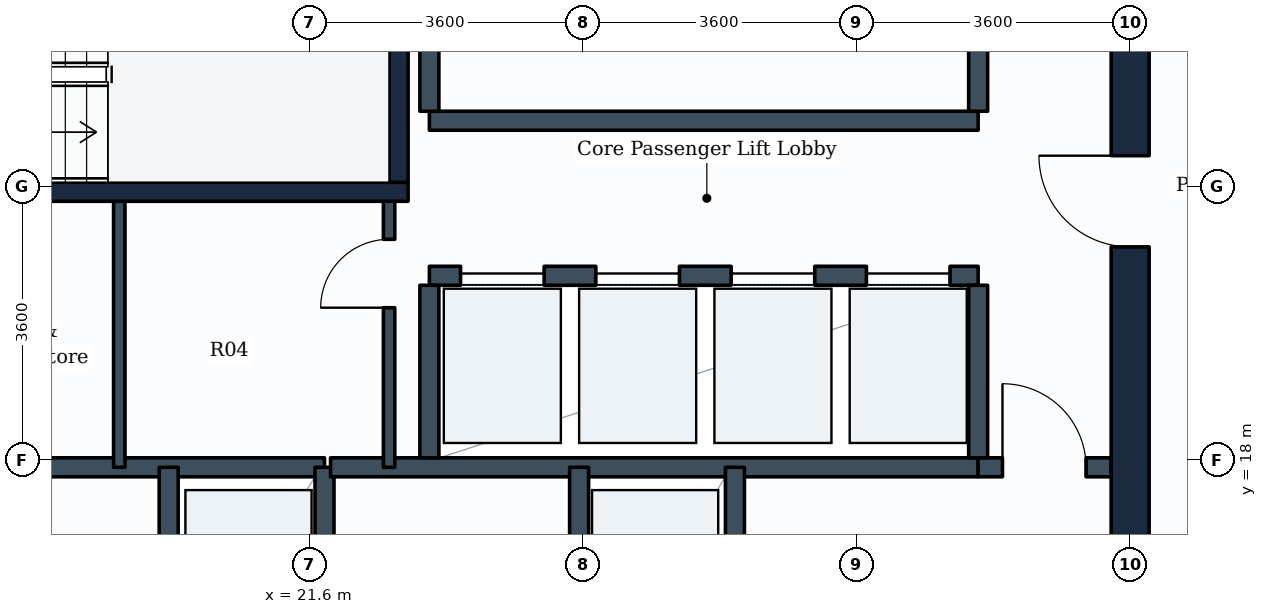
"""IFC4 building model, lengths in metres.
Left out: names, types, materials, properties, quantities, classifications, styles, units other than length and angle.
Written with IfcOpenShell. Run it as: python <this file> out.ifc"""

import sys

from ifc_helpers import new_model, si_unit, direction, frame, frame_2d, origin, place, context, subcontext, project, spatial, rectangle, extrude, element, fill, save


model = new_model("IFC4")
c1 = context("Model", 3, precision=1e-05, world=origin(), true_north=direction((0.0, 1.0)))
c2 = subcontext(c1, "Body", "Model", "MODEL_VIEW")
j1 = project(units=[si_unit("LENGTHUNIT", "METRE"), si_unit("PLANEANGLEUNIT", "RADIAN")], contexts=[c1])
p1 = place(None, origin())
s1 = spatial("IfcSite", under=j1, at=p1, CompositionType="ELEMENT")
p2 = place(p1, origin())
s2 = spatial("IfcBuilding", under=s1, at=p2, CompositionType="ELEMENT")
p3 = place(p2, frame((0.0, 0.0, 139.0)))
s3 = spatial("IfcBuildingStorey", under=s2, at=p3, CompositionType="ELEMENT", Elevation=139.0)
p4 = place(p3, frame((32.4, 10.8, 0.0), z_axis=(0.0, 0.0, 1.0), x_axis=(0.0, 1.0, 0.0)))
e1 = element("IfcWall", 1, at=p4, inside=s3, PredefinedType="SHEAR", context=c2, shape_type="SweptSolid", body=[
    extrude(rectangle(XDim=14.4, YDim=0.5, at=frame_2d((7.2, 0.0))), origin(), (0.0, 0.0, 1.0), 3.55),
])
p5 = place(p4, frame((4.35, 0.0, 0.0)))
e2 = element("IfcOpeningElement", 2, at=p5, cuts=e1, PredefinedType="OPENING", context=c2, shape_type="SweptSolid", body=[
    extrude(rectangle(XDim=1.2, YDim=2.1, at=frame_2d((0.6, 1.05))), frame((0.0, 0.26, 0.0), z_axis=(0.0, -1.0, 0.0), x_axis=(1.0, 0.0, 0.0)), (0.0, 0.0, 1.0), 0.52),
])
p6 = place(p4, frame((10.0, 0.0, 0.0)))
e3 = element("IfcOpeningElement", 3, at=p6, cuts=e1, PredefinedType="OPENING", context=c2, shape_type="SweptSolid", body=[
    extrude(rectangle(XDim=1.2, YDim=2.1, at=frame_2d((0.6, 1.05))), frame((0.0, 0.26, 0.0), z_axis=(0.0, -1.0, 0.0), x_axis=(1.0, 0.0, 0.0)), (0.0, 0.0, 1.0), 0.52),
])
p7 = place(p3, frame((14.65, 21.525, 0.0), z_axis=(0.0, 0.0, 1.0), x_axis=(1.0, 0.0, 0.0)))
e4 = element("IfcWall", 4, at=p7, inside=s3, PredefinedType="SHEAR", context=c2, shape_type="SweptSolid", body=[
    extrude(rectangle(XDim=8.25, YDim=0.25, at=frame_2d((4.125, 0.0))), origin(), (0.0, 0.0, 1.0), 3.55),
])
p8 = place(p3, frame((22.775, 21.65, 0.0), z_axis=(0.0, 0.0, 1.0), x_axis=(0.0, 1.0, 0.0)))
e5 = element("IfcWall", 5, at=p8, inside=s3, PredefinedType="SHEAR", context=c2, shape_type="SweptSolid", body=[
    extrude(rectangle(XDim=2.84, YDim=0.25, at=frame_2d((1.42, 0.0))), origin(), (0.0, 0.0, 1.0), 3.55),
])
p9 = place(p3, frame((14.65, 17.9, 0.0), z_axis=(0.0, 0.0, 1.0), x_axis=(1.0, 0.0, 0.0)))
e6 = element("IfcWall", 6, at=p9, inside=s3, PredefinedType="PARTITIONING", context=c2, shape_type="SweptSolid", body=[
    extrude(rectangle(XDim=7.15, YDim=0.25, at=frame_2d((3.575, 0.0))), origin(), (0.0, 0.0, 1.0), 3.535),
])
p10 = place(p3, frame((19.75, 14.84, 0.0), z_axis=(0.0, 0.0, 1.0), x_axis=(0.0, 1.0, 0.0)))
e7 = element("IfcWall", 7, at=p10, inside=s3, PredefinedType="PARTITIONING", context=c2, shape_type="SweptSolid", body=[
    extrude(rectangle(XDim=3.06, YDim=0.25, at=frame_2d((1.53, 0.0))), origin(), (0.0, 0.0, 1.0), 3.535),
])
p11 = place(p10, frame((0.98, 0.0, 0.0)))
e8 = element("IfcOpeningElement", 8, at=p11, cuts=e7, PredefinedType="OPENING", context=c2, shape_type="SweptSolid", body=[
    extrude(rectangle(XDim=1.1, YDim=2.1, at=frame_2d((0.55, 1.05))), frame((0.0, 0.135, 0.0), z_axis=(0.0, -1.0, 0.0), x_axis=(1.0, 0.0, 0.0)), (0.0, 0.0, 1.0), 0.27),
])
p12 = place(p3, frame((21.8, 14.84, 0.0), z_axis=(0.0, 0.0, 1.0), x_axis=(0.0, 1.0, 0.0)))
e9 = element("IfcWall", 9, at=p12, inside=s3, PredefinedType="PARTITIONING", context=c2, shape_type="SweptSolid", body=[
    extrude(rectangle(XDim=3.06, YDim=0.25, at=frame_2d((1.53, 0.0))), origin(), (0.0, 0.0, 1.0), 3.535),
])
p13 = place(p3, frame((21.88, 17.9, 0.0), z_axis=(0.0, 0.0, 1.0), x_axis=(1.0, 0.0, 0.0)))
e10 = element("IfcWall", 10, at=p13, inside=s3, PredefinedType="PARTITIONING", context=c2, shape_type="SweptSolid", body=[
    extrude(rectangle(XDim=8.52, YDim=0.25, at=frame_2d((4.26, 0.0))), origin(), (0.0, 0.0, 1.0), 3.535),
])
p14 = place(p3, frame((30.4, 17.9, 0.0), z_axis=(0.0, 0.0, 1.0), x_axis=(1.0, 0.0, 0.0)))
e11 = element("IfcWall", 11, at=p14, inside=s3, PredefinedType="PARTITIONING", context=c2, shape_type="SweptSolid", body=[
    extrude(rectangle(XDim=1.75, YDim=0.25, at=frame_2d((0.875, 0.0))), origin(), (0.0, 0.0, 1.0), 3.535),
])
p15 = place(p14, frame((0.32, 0.0, 0.0)))
e12 = element("IfcOpeningElement", 12, at=p15, cuts=e11, PredefinedType="OPENING", context=c2, shape_type="SweptSolid", body=[
    extrude(rectangle(XDim=1.1, YDim=2.1, at=frame_2d((0.55, 1.05))), frame((0.0, 0.135, 0.0), z_axis=(0.0, -1.0, 0.0), x_axis=(1.0, 0.0, 0.0)), (0.0, 0.0, 1.0), 0.27),
])
p16 = place(p3, frame((25.15, 14.84, 0.0), z_axis=(0.0, 0.0, 1.0), x_axis=(0.0, 1.0, 0.0)))
e13 = element("IfcWall", 13, at=p16, inside=s3, PredefinedType="PARTITIONING", context=c2, shape_type="SweptSolid", body=[
    extrude(rectangle(XDim=3.06, YDim=0.25, at=frame_2d((1.53, 0.0))), origin(), (0.0, 0.0, 1.0), 3.535),
])
p17 = place(p3, frame((27.2, 14.84, 0.0), z_axis=(0.0, 0.0, 1.0), x_axis=(0.0, 1.0, 0.0)))
e14 = element("IfcWall", 14, at=p17, inside=s3, PredefinedType="PARTITIONING", context=c2, shape_type="SweptSolid", body=[
    extrude(rectangle(XDim=3.06, YDim=0.25, at=frame_2d((1.53, 0.0))), origin(), (0.0, 0.0, 1.0), 3.535),
])
p18 = place(p17, frame((0.98, 0.0, 0.0)))
e15 = element("IfcOpeningElement", 15, at=p18, cuts=e14, PredefinedType="OPENING", context=c2, shape_type="SweptSolid", body=[
    extrude(rectangle(XDim=1.1, YDim=2.1, at=frame_2d((0.55, 1.05))), frame((0.0, 0.135, 0.0), z_axis=(0.0, -1.0, 0.0), x_axis=(1.0, 0.0, 0.0)), (0.0, 0.0, 1.0), 0.27),
])
p19 = place(p3, frame((23.18, 20.42, 0.0), z_axis=(0.0, 0.0, 1.0), x_axis=(1.0, 0.0, 0.0)))
e16 = element("IfcWall", 16, at=p19, inside=s3, PredefinedType="PARTITIONING", context=c2, shape_type="SweptSolid", body=[
    extrude(rectangle(XDim=7.22, YDim=0.25, at=frame_2d((3.61, 0.0))), origin(), (0.0, 0.0, 1.0), 3.535),
])
p20 = place(p19, frame((0.41, 0.0, 0.0)))
e17 = element("IfcOpeningElement", 17, at=p20, cuts=e16, PredefinedType="OPENING", context=c2, shape_type="SweptSolid", body=[
    extrude(rectangle(XDim=1.1, YDim=2.1, at=frame_2d((0.55, 1.05))), frame((0.0, 0.135, 0.0), z_axis=(0.0, -1.0, 0.0), x_axis=(1.0, 0.0, 0.0)), (0.0, 0.0, 1.0), 0.27),
])
p21 = place(p19, frame((2.19, 0.0, 0.0)))
e18 = element("IfcOpeningElement", 18, at=p21, cuts=e16, PredefinedType="OPENING", context=c2, shape_type="SweptSolid", body=[
    extrude(rectangle(XDim=1.1, YDim=2.1, at=frame_2d((0.55, 1.05))), frame((0.0, 0.135, 0.0), z_axis=(0.0, -1.0, 0.0), x_axis=(1.0, 0.0, 0.0)), (0.0, 0.0, 1.0), 0.27),
])
p22 = place(p19, frame((3.97, 0.0, 0.0)))
e19 = element("IfcOpeningElement", 19, at=p22, cuts=e16, PredefinedType="OPENING", context=c2, shape_type="SweptSolid", body=[
    extrude(rectangle(XDim=1.1, YDim=2.1, at=frame_2d((0.55, 1.05))), frame((0.0, 0.135, 0.0), z_axis=(0.0, -1.0, 0.0), x_axis=(1.0, 0.0, 0.0)), (0.0, 0.0, 1.0), 0.27),
])
p23 = place(p19, frame((5.75, 0.0, 0.0)))
e20 = element("IfcOpeningElement", 20, at=p23, cuts=e16, PredefinedType="OPENING", context=c2, shape_type="SweptSolid", body=[
    extrude(rectangle(XDim=1.1, YDim=2.1, at=frame_2d((0.55, 1.05))), frame((0.0, 0.135, 0.0), z_axis=(0.0, -1.0, 0.0), x_axis=(1.0, 0.0, 0.0)), (0.0, 0.0, 1.0), 0.27),
])
for number, where, z_axis, x_axis in (
    (21, (23.18, 18.025, 0.0), (0.0, 0.0, 1.0), (0.0, 1.0, 0.0)),
    (22, (30.4, 18.025, 0.0), (0.0, 0.0, 1.0), (0.0, 1.0, 0.0)),
):
    element("IfcWall", number, at=place(p3, frame(where, z_axis=z_axis, x_axis=x_axis)), inside=s3, PredefinedType="PARTITIONING", context=c2, shape_type="SweptSolid", body=[
        extrude(rectangle(XDim=2.27, YDim=0.25, at=frame_2d((1.135, 0.0))), origin(), (0.0, 0.0, 1.0), 3.535),
    ])
p24 = place(p3, frame((23.18, 22.46, 0.0), z_axis=(0.0, 0.0, 1.0), x_axis=(1.0, 0.0, 0.0)))
e23 = element("IfcWall", 23, at=p24, inside=s3, PredefinedType="PARTITIONING", context=c2, shape_type="SweptSolid", body=[
    extrude(rectangle(XDim=7.22, YDim=0.25, at=frame_2d((3.61, 0.0))), origin(), (0.0, 0.0, 1.0), 3.535),
])
for number, where, z_axis, x_axis in (
    (24, (23.18, 22.585, 0.0), (0.0, 0.0, 1.0), (0.0, 1.0, 0.0)),
    (25, (30.4, 22.585, 0.0), (0.0, 0.0, 1.0), (0.0, 1.0, 0.0)),
):
    element("IfcWall", number, at=place(p3, frame(where, z_axis=z_axis, x_axis=x_axis)), inside=s3, PredefinedType="PARTITIONING", context=c2, shape_type="SweptSolid", body=[
        extrude(rectangle(XDim=2.315, YDim=0.25, at=frame_2d((1.157, 0.0))), origin(), (0.0, 0.0, 1.0), 3.535),
    ])
p25 = place(p3, frame((22.65, 17.9, 0.0), z_axis=(0.0, 0.0, 1.0), x_axis=(0.0, 1.0, 0.0)))
e26 = element("IfcWall", 26, at=p25, inside=s3, PredefinedType="PARTITIONING", context=c2, shape_type="SweptSolid", body=[
    extrude(rectangle(XDim=3.625, YDim=0.15, at=frame_2d((1.812, 0.0))), origin(), (0.0, 0.0, 1.0), 3.535),
])
p26 = place(p25, frame((2.1, 0.0, 0.0)))
e27 = element("IfcOpeningElement", 27, at=p26, cuts=e26, PredefinedType="OPENING", context=c2, shape_type="SweptSolid", body=[
    extrude(rectangle(XDim=0.9, YDim=2.1, at=frame_2d((0.45, 1.05))), frame((0.0, 0.085, 0.0), z_axis=(0.0, -1.0, 0.0), x_axis=(1.0, 0.0, 0.0)), (0.0, 0.0, 1.0), 0.17),
])
p27 = place(p3, frame((19.1, 17.9, 0.0), z_axis=(0.0, 0.0, 1.0), x_axis=(0.0, 1.0, 0.0)))
e28 = element("IfcWall", 28, at=p27, inside=s3, PredefinedType="PARTITIONING", context=c2, shape_type="SweptSolid", body=[
    extrude(rectangle(XDim=3.625, YDim=0.15, at=frame_2d((1.812, 0.0))), origin(), (0.0, 0.0, 1.0), 3.535),
])
p28 = place(p15, origin())
e29 = element("IfcDoor", 29, at=p28, inside=s3, OperationType="SINGLE_SWING_LEFT", PredefinedType="DOOR", context=c2, shape_type="SweptSolid", body=[
    extrude(rectangle(XDim=1.1, YDim=2.1, at=frame_2d((0.55, 1.05))), frame((0.0, 0.025, 0.0), z_axis=(0.0, -1.0, 0.0), x_axis=(1.0, 0.0, 0.0)), (0.0, 0.0, 1.0), 0.05),
])
fill(e12, e29)
p29 = place(p20, origin())
e30 = element("IfcDoor", 30, at=p29, inside=s3, OperationType="SLIDING_TO_LEFT", PredefinedType="DOOR", context=c2, shape_type="SweptSolid", body=[
    extrude(rectangle(XDim=1.1, YDim=2.1, at=frame_2d((0.55, 1.05))), frame((0.0, 0.025, 0.0), z_axis=(0.0, -1.0, 0.0), x_axis=(1.0, 0.0, 0.0)), (0.0, 0.0, 1.0), 0.05),
])
fill(e17, e30)
p30 = place(p21, origin())
e31 = element("IfcDoor", 31, at=p30, inside=s3, OperationType="SLIDING_TO_LEFT", PredefinedType="DOOR", context=c2, shape_type="SweptSolid", body=[
    extrude(rectangle(XDim=1.1, YDim=2.1, at=frame_2d((0.55, 1.05))), frame((0.0, 0.025, 0.0), z_axis=(0.0, -1.0, 0.0), x_axis=(1.0, 0.0, 0.0)), (0.0, 0.0, 1.0), 0.05),
])
fill(e18, e31)
p31 = place(p22, origin())
e32 = element("IfcDoor", 32, at=p31, inside=s3, OperationType="SLIDING_TO_LEFT", PredefinedType="DOOR", context=c2, shape_type="SweptSolid", body=[
    extrude(rectangle(XDim=1.1, YDim=2.1, at=frame_2d((0.55, 1.05))), frame((0.0, 0.025, 0.0), z_axis=(0.0, -1.0, 0.0), x_axis=(1.0, 0.0, 0.0)), (0.0, 0.0, 1.0), 0.05),
])
fill(e19, e32)
p32 = place(p23, origin())
e33 = element("IfcDoor", 33, at=p32, inside=s3, OperationType="SLIDING_TO_LEFT", PredefinedType="DOOR", context=c2, shape_type="SweptSolid", body=[
    extrude(rectangle(XDim=1.1, YDim=2.1, at=frame_2d((0.55, 1.05))), frame((0.0, 0.025, 0.0), z_axis=(0.0, -1.0, 0.0), x_axis=(1.0, 0.0, 0.0)), (0.0, 0.0, 1.0), 0.05),
])
fill(e20, e33)
p33 = place(p6, origin())
e34 = element("IfcDoor", 34, at=p33, inside=s3, OperationType="SINGLE_SWING_RIGHT", PredefinedType="DOOR", context=c2, shape_type="SweptSolid", body=[
    extrude(rectangle(XDim=1.2, YDim=2.1, at=frame_2d((0.6, 1.05))), frame((0.0, 0.025, 0.0), z_axis=(0.0, -1.0, 0.0), x_axis=(1.0, 0.0, 0.0)), (0.0, 0.0, 1.0), 0.05),
])
fill(e3, e34)
p34 = place(p26, origin())
e35 = element("IfcDoor", 35, at=p34, inside=s3, OperationType="SINGLE_SWING_LEFT", PredefinedType="DOOR", context=c2, shape_type="SweptSolid", body=[
    extrude(rectangle(XDim=0.9, YDim=2.1, at=frame_2d((0.45, 1.05))), frame((0.0, 0.025, 0.0), z_axis=(0.0, -1.0, 0.0), x_axis=(1.0, 0.0, 0.0)), (0.0, 0.0, 1.0), 0.05),
])
fill(e27, e35)
save(model, sys.argv[1])
